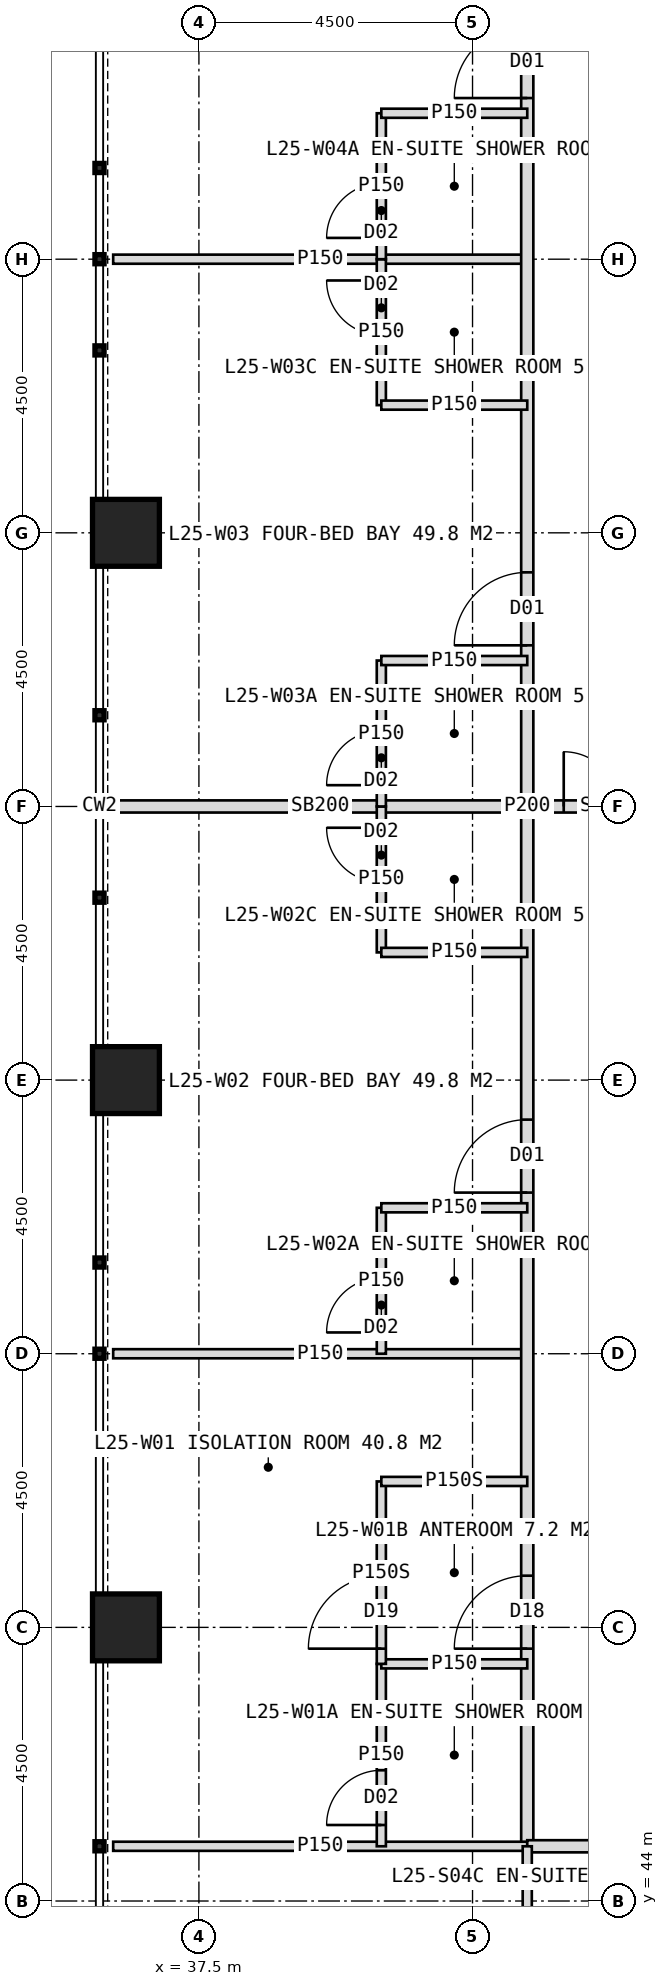
"""IFC4 building model, lengths in metres.
Left out: names, types, materials, properties, quantities, classifications, styles, units other than length and angle.
Written with IfcOpenShell. Run it as: python <this file> out.ifc"""

import sys

from ifc_helpers import new_model, si_unit, direction, frame, frame_2d, origin, origin_2d, place, context, subcontext, project, spatial, rectangle, hollow_rectangle, extrude, element, fill, save


model = new_model("IFC4")
c1 = context("Model", 3, precision=1e-05, world=origin(), true_north=direction((0.0, 1.0)))
c2 = subcontext(c1, "Body", "Model", "MODEL_VIEW")
j1 = project(units=[si_unit("LENGTHUNIT", "METRE"), si_unit("PLANEANGLEUNIT", "RADIAN")], contexts=[c1])
p1 = place(None, origin())
s1 = spatial("IfcSite", under=j1, at=p1, CompositionType="ELEMENT")
p2 = place(p1, origin())
s2 = spatial("IfcBuilding", under=s1, at=p2, CompositionType="ELEMENT")
p3 = place(p2, frame((0.0, 0.0, 108.0)))
s3 = spatial("IfcBuildingStorey", under=s2, at=p3, CompositionType="ELEMENT", Elevation=108.0)
for number, where, z_axis, x_axis in (
    (1, (36.3, 48.5, 0.0), (0.0, 0.0, 1.0), (1.0, 0.0, 0.0)),
    (2, (36.3, 57.5, 0.0), (0.0, 0.0, 1.0), (1.0, 0.0, 0.0)),
    (3, (36.3, 66.5, 0.0), (0.0, 0.0, 1.0), (1.0, 0.0, 0.0)),
):
    element("IfcColumn", number, at=place(p3, frame(where, z_axis=z_axis, x_axis=x_axis)), inside=s3, PredefinedType="COLUMN", context=c2, shape_type="SweptSolid", body=[
        extrude(hollow_rectangle(XDim=1.1, YDim=1.1, WallThickness=0.1, at=origin_2d()), origin(), (0.0, 0.0, 1.0), 4.0),
    ])
p4 = place(p3, frame((42.9, 53.0, 0.0), z_axis=(0.0, 0.0, 1.0), x_axis=(-1.0, 0.0, 0.0)))
e4 = element("IfcWall", 4, at=p4, inside=s3, PredefinedType="PARTITIONING", context=c2, shape_type="SweptSolid", body=[
    extrude(rectangle(XDim=6.81, YDim=0.15, at=frame_2d((3.405, 0.0))), origin(), (0.0, 0.0, 1.0), 3.75),
])
p5 = place(p3, frame((42.9, 62.0, 0.0), z_axis=(0.0, 0.0, 1.0), x_axis=(-1.0, 0.0, 0.0)))
e5 = element("IfcWall", 5, at=p5, inside=s3, PredefinedType="SOLIDWALL", context=c2, shape_type="SweptSolid", body=[
    extrude(rectangle(XDim=6.81, YDim=0.2, at=frame_2d((3.405, 0.0))), origin(), (0.0, 0.0, 1.0), 2.95),
])
p6 = place(p3, frame((42.9, 71.0, 0.0), z_axis=(0.0, 0.0, 1.0), x_axis=(-1.0, 0.0, 0.0)))
e6 = element("IfcWall", 6, at=p6, inside=s3, PredefinedType="PARTITIONING", context=c2, shape_type="SweptSolid", body=[
    extrude(rectangle(XDim=6.81, YDim=0.15, at=frame_2d((3.405, 0.0))), origin(), (0.0, 0.0, 1.0), 3.75),
])
p7 = place(p3, frame((42.9, 44.9, 0.0), z_axis=(0.0, 0.0, 1.0), x_axis=(0.0, 1.0, 0.0)))
e7 = element("IfcWall", 7, at=p7, inside=s3, PredefinedType="PARTITIONING", context=c2, shape_type="SweptSolid", body=[
    extrude(rectangle(XDim=34.2, YDim=0.2, at=frame_2d((17.1, 0.0))), origin(), (0.0, 0.0, 1.0), 3.75),
])
p8 = place(p7, frame((3.25, 0.0, 0.0)))
e8 = element("IfcOpeningElement", 8, at=p8, cuts=e7, PredefinedType="OPENING", context=c2, shape_type="SweptSolid", body=[
    extrude(rectangle(XDim=1.2, YDim=2.2, at=frame_2d((0.6, 1.1))), frame((0.0, 0.11, 0.0), z_axis=(0.0, -1.0, 0.0), x_axis=(1.0, 0.0, 0.0)), (0.0, 0.0, 1.0), 0.22),
])
p9 = place(p7, frame((10.75, 0.0, 0.0)))
e9 = element("IfcOpeningElement", 9, at=p9, cuts=e7, PredefinedType="OPENING", context=c2, shape_type="SweptSolid", body=[
    extrude(rectangle(XDim=1.2, YDim=2.2, at=frame_2d((0.6, 1.1))), frame((0.0, 0.11, 0.0), z_axis=(0.0, -1.0, 0.0), x_axis=(1.0, 0.0, 0.0)), (0.0, 0.0, 1.0), 0.22),
])
p10 = place(p7, frame((19.75, 0.0, 0.0)))
e10 = element("IfcOpeningElement", 10, at=p10, cuts=e7, PredefinedType="OPENING", context=c2, shape_type="SweptSolid", body=[
    extrude(rectangle(XDim=1.2, YDim=2.2, at=frame_2d((0.6, 1.1))), frame((0.0, 0.11, 0.0), z_axis=(0.0, -1.0, 0.0), x_axis=(1.0, 0.0, 0.0)), (0.0, 0.0, 1.0), 0.22),
])
p11 = place(p7, frame((28.75, 0.0, 0.0)))
e11 = element("IfcOpeningElement", 11, at=p11, cuts=e7, PredefinedType="OPENING", context=c2, shape_type="SweptSolid", body=[
    extrude(rectangle(XDim=1.2, YDim=2.2, at=frame_2d((0.6, 1.1))), frame((0.0, 0.11, 0.0), z_axis=(0.0, -1.0, 0.0), x_axis=(1.0, 0.0, 0.0)), (0.0, 0.0, 1.0), 0.22),
])
p12 = place(p3, frame((42.9, 44.9, 0.0), z_axis=(0.0, 0.0, 1.0), x_axis=(-1.0, 0.0, 0.0)))
e12 = element("IfcWall", 12, at=p12, inside=s3, PredefinedType="PARTITIONING", context=c2, shape_type="SweptSolid", body=[
    extrude(rectangle(XDim=6.81, YDim=0.15, at=frame_2d((3.405, 0.0))), origin(), (0.0, 0.0, 1.0), 3.75),
])
p13 = place(p3, frame((40.5, 44.9, 0.0), z_axis=(0.0, 0.0, 1.0), x_axis=(0.0, 1.0, 0.0)))
e13 = element("IfcWall", 13, at=p13, inside=s3, PredefinedType="PARTITIONING", context=c2, shape_type="SweptSolid", body=[
    extrude(rectangle(XDim=3.0, YDim=0.15, at=frame_2d((1.5, 0.0))), origin(), (0.0, 0.0, 1.0), 3.75),
])
p14 = place(p13, frame((0.35, 0.0, 0.0)))
e14 = element("IfcOpeningElement", 14, at=p14, cuts=e13, PredefinedType="OPENING", context=c2, shape_type="SweptSolid", body=[
    extrude(rectangle(XDim=0.9, YDim=2.1, at=frame_2d((0.45, 1.05))), frame((0.0, 0.085, 0.0), z_axis=(0.0, -1.0, 0.0), x_axis=(1.0, 0.0, 0.0)), (0.0, 0.0, 1.0), 0.17),
])
p15 = place(p3, frame((42.9, 47.9, 0.0), z_axis=(0.0, 0.0, 1.0), x_axis=(-1.0, 0.0, 0.0)))
e15 = element("IfcWall", 15, at=p15, inside=s3, PredefinedType="PARTITIONING", context=c2, shape_type="SweptSolid", body=[
    extrude(rectangle(XDim=2.4, YDim=0.15, at=frame_2d((1.2, 0.0))), origin(), (0.0, 0.0, 1.0), 3.75),
])
p16 = place(p3, frame((40.5, 47.9, 0.0), z_axis=(0.0, 0.0, 1.0), x_axis=(0.0, 1.0, 0.0)))
e16 = element("IfcWall", 16, at=p16, inside=s3, PredefinedType="PARTITIONING", context=c2, shape_type="SweptSolid", body=[
    extrude(rectangle(XDim=3.0, YDim=0.15, at=frame_2d((1.5, 0.0))), origin(), (0.0, 0.0, 1.0), 3.75),
])
p17 = place(p16, frame((0.25, 0.0, 0.0)))
e17 = element("IfcOpeningElement", 17, at=p17, cuts=e16, PredefinedType="OPENING", context=c2, shape_type="SweptSolid", body=[
    extrude(rectangle(XDim=1.2, YDim=2.2, at=frame_2d((0.6, 1.1))), frame((0.0, 0.085, 0.0), z_axis=(0.0, -1.0, 0.0), x_axis=(1.0, 0.0, 0.0)), (0.0, 0.0, 1.0), 0.17),
])
p18 = place(p3, frame((42.9, 50.9, 0.0), z_axis=(0.0, 0.0, 1.0), x_axis=(-1.0, 0.0, 0.0)))
e18 = element("IfcWall", 18, at=p18, inside=s3, PredefinedType="PARTITIONING", context=c2, shape_type="SweptSolid", body=[
    extrude(rectangle(XDim=2.4, YDim=0.15, at=frame_2d((1.2, 0.0))), origin(), (0.0, 0.0, 1.0), 3.75),
])
p19 = place(p3, frame((40.5, 53.0, 0.0), z_axis=(0.0, 0.0, 1.0), x_axis=(0.0, 1.0, 0.0)))
e19 = element("IfcWall", 19, at=p19, inside=s3, PredefinedType="PARTITIONING", context=c2, shape_type="SweptSolid", body=[
    extrude(rectangle(XDim=2.4, YDim=0.15, at=frame_2d((1.2, 0.0))), origin(), (0.0, 0.0, 1.0), 3.75),
])
p20 = place(p19, frame((0.35, 0.0, 0.0)))
e20 = element("IfcOpeningElement", 20, at=p20, cuts=e19, PredefinedType="OPENING", context=c2, shape_type="SweptSolid", body=[
    extrude(rectangle(XDim=0.9, YDim=2.1, at=frame_2d((0.45, 1.05))), frame((0.0, 0.085, 0.0), z_axis=(0.0, -1.0, 0.0), x_axis=(1.0, 0.0, 0.0)), (0.0, 0.0, 1.0), 0.17),
])
p21 = place(p3, frame((42.9, 55.4, 0.0), z_axis=(0.0, 0.0, 1.0), x_axis=(-1.0, 0.0, 0.0)))
e21 = element("IfcWall", 21, at=p21, inside=s3, PredefinedType="PARTITIONING", context=c2, shape_type="SweptSolid", body=[
    extrude(rectangle(XDim=2.4, YDim=0.15, at=frame_2d((1.2, 0.0))), origin(), (0.0, 0.0, 1.0), 3.75),
])
p22 = place(p3, frame((40.5, 59.6, 0.0), z_axis=(0.0, 0.0, 1.0), x_axis=(0.0, 1.0, 0.0)))
e22 = element("IfcWall", 22, at=p22, inside=s3, PredefinedType="PARTITIONING", context=c2, shape_type="SweptSolid", body=[
    extrude(rectangle(XDim=2.4, YDim=0.15, at=frame_2d((1.2, 0.0))), origin(), (0.0, 0.0, 1.0), 3.75),
])
p23 = place(p22, frame((1.15, 0.0, 0.0)))
e23 = element("IfcOpeningElement", 23, at=p23, cuts=e22, PredefinedType="OPENING", context=c2, shape_type="SweptSolid", body=[
    extrude(rectangle(XDim=0.9, YDim=2.1, at=frame_2d((0.45, 1.05))), frame((0.0, 0.085, 0.0), z_axis=(0.0, -1.0, 0.0), x_axis=(1.0, 0.0, 0.0)), (0.0, 0.0, 1.0), 0.17),
])
p24 = place(p3, frame((42.9, 59.6, 0.0), z_axis=(0.0, 0.0, 1.0), x_axis=(-1.0, 0.0, 0.0)))
e24 = element("IfcWall", 24, at=p24, inside=s3, PredefinedType="PARTITIONING", context=c2, shape_type="SweptSolid", body=[
    extrude(rectangle(XDim=2.4, YDim=0.15, at=frame_2d((1.2, 0.0))), origin(), (0.0, 0.0, 1.0), 3.75),
])
p25 = place(p3, frame((40.5, 62.0, 0.0), z_axis=(0.0, 0.0, 1.0), x_axis=(0.0, 1.0, 0.0)))
e25 = element("IfcWall", 25, at=p25, inside=s3, PredefinedType="PARTITIONING", context=c2, shape_type="SweptSolid", body=[
    extrude(rectangle(XDim=2.4, YDim=0.15, at=frame_2d((1.2, 0.0))), origin(), (0.0, 0.0, 1.0), 3.75),
])
p26 = place(p25, frame((0.35, 0.0, 0.0)))
e26 = element("IfcOpeningElement", 26, at=p26, cuts=e25, PredefinedType="OPENING", context=c2, shape_type="SweptSolid", body=[
    extrude(rectangle(XDim=0.9, YDim=2.1, at=frame_2d((0.45, 1.05))), frame((0.0, 0.085, 0.0), z_axis=(0.0, -1.0, 0.0), x_axis=(1.0, 0.0, 0.0)), (0.0, 0.0, 1.0), 0.17),
])
p27 = place(p3, frame((42.9, 64.4, 0.0), z_axis=(0.0, 0.0, 1.0), x_axis=(-1.0, 0.0, 0.0)))
e27 = element("IfcWall", 27, at=p27, inside=s3, PredefinedType="PARTITIONING", context=c2, shape_type="SweptSolid", body=[
    extrude(rectangle(XDim=2.4, YDim=0.15, at=frame_2d((1.2, 0.0))), origin(), (0.0, 0.0, 1.0), 3.75),
])
p28 = place(p3, frame((40.5, 68.6, 0.0), z_axis=(0.0, 0.0, 1.0), x_axis=(0.0, 1.0, 0.0)))
e28 = element("IfcWall", 28, at=p28, inside=s3, PredefinedType="PARTITIONING", context=c2, shape_type="SweptSolid", body=[
    extrude(rectangle(XDim=2.4, YDim=0.15, at=frame_2d((1.2, 0.0))), origin(), (0.0, 0.0, 1.0), 3.75),
])
p29 = place(p28, frame((1.15, 0.0, 0.0)))
e29 = element("IfcOpeningElement", 29, at=p29, cuts=e28, PredefinedType="OPENING", context=c2, shape_type="SweptSolid", body=[
    extrude(rectangle(XDim=0.9, YDim=2.1, at=frame_2d((0.45, 1.05))), frame((0.0, 0.085, 0.0), z_axis=(0.0, -1.0, 0.0), x_axis=(1.0, 0.0, 0.0)), (0.0, 0.0, 1.0), 0.17),
])
p30 = place(p3, frame((42.9, 68.6, 0.0), z_axis=(0.0, 0.0, 1.0), x_axis=(-1.0, 0.0, 0.0)))
e30 = element("IfcWall", 30, at=p30, inside=s3, PredefinedType="PARTITIONING", context=c2, shape_type="SweptSolid", body=[
    extrude(rectangle(XDim=2.4, YDim=0.15, at=frame_2d((1.2, 0.0))), origin(), (0.0, 0.0, 1.0), 3.75),
])
p31 = place(p3, frame((40.5, 71.0, 0.0), z_axis=(0.0, 0.0, 1.0), x_axis=(0.0, 1.0, 0.0)))
e31 = element("IfcWall", 31, at=p31, inside=s3, PredefinedType="PARTITIONING", context=c2, shape_type="SweptSolid", body=[
    extrude(rectangle(XDim=2.4, YDim=0.15, at=frame_2d((1.2, 0.0))), origin(), (0.0, 0.0, 1.0), 3.75),
])
p32 = place(p31, frame((0.35, 0.0, 0.0)))
e32 = element("IfcOpeningElement", 32, at=p32, cuts=e31, PredefinedType="OPENING", context=c2, shape_type="SweptSolid", body=[
    extrude(rectangle(XDim=0.9, YDim=2.1, at=frame_2d((0.45, 1.05))), frame((0.0, 0.085, 0.0), z_axis=(0.0, -1.0, 0.0), x_axis=(1.0, 0.0, 0.0)), (0.0, 0.0, 1.0), 0.17),
])
p33 = place(p3, frame((42.9, 73.4, 0.0), z_axis=(0.0, 0.0, 1.0), x_axis=(-1.0, 0.0, 0.0)))
e33 = element("IfcWall", 33, at=p33, inside=s3, PredefinedType="PARTITIONING", context=c2, shape_type="SweptSolid", body=[
    extrude(rectangle(XDim=2.4, YDim=0.15, at=frame_2d((1.2, 0.0))), origin(), (0.0, 0.0, 1.0), 3.75),
])
p34 = place(p3, frame((77.1, 44.9, 0.0), z_axis=(0.0, 0.0, 1.0), x_axis=(-1.0, 0.0, 0.0)))
e34 = element("IfcWall", 34, at=p34, inside=s3, PredefinedType="PARTITIONING", context=c2, shape_type="SweptSolid", body=[
    extrude(rectangle(XDim=34.2, YDim=0.2, at=frame_2d((17.1, 0.0))), origin(), (0.0, 0.0, 1.0), 3.75),
])
p35 = place(p34, frame((3.25, 0.0, 0.0)))
e35 = element("IfcOpeningElement", 35, at=p35, cuts=e34, PredefinedType="OPENING", context=c2, shape_type="SweptSolid", body=[
    extrude(rectangle(XDim=1.2, YDim=2.2, at=frame_2d((0.6, 1.1))), frame((0.0, 0.11, 0.0), z_axis=(0.0, -1.0, 0.0), x_axis=(1.0, 0.0, 0.0)), (0.0, 0.0, 1.0), 0.22),
])
p36 = place(p34, frame((9.25, 0.0, 0.0)))
e36 = element("IfcOpeningElement", 36, at=p36, cuts=e34, PredefinedType="OPENING", context=c2, shape_type="SweptSolid", body=[
    extrude(rectangle(XDim=1.2, YDim=2.2, at=frame_2d((0.6, 1.1))), frame((0.0, 0.11, 0.0), z_axis=(0.0, -1.0, 0.0), x_axis=(1.0, 0.0, 0.0)), (0.0, 0.0, 1.0), 0.22),
])
p37 = place(p34, frame((18.25, 0.0, 0.0)))
e37 = element("IfcOpeningElement", 37, at=p37, cuts=e34, PredefinedType="OPENING", context=c2, shape_type="SweptSolid", body=[
    extrude(rectangle(XDim=1.2, YDim=2.2, at=frame_2d((0.6, 1.1))), frame((0.0, 0.11, 0.0), z_axis=(0.0, -1.0, 0.0), x_axis=(1.0, 0.0, 0.0)), (0.0, 0.0, 1.0), 0.22),
])
p38 = place(p34, frame((27.25, 0.0, 0.0)))
e38 = element("IfcOpeningElement", 38, at=p38, cuts=e34, PredefinedType="OPENING", context=c2, shape_type="SweptSolid", body=[
    extrude(rectangle(XDim=1.2, YDim=2.2, at=frame_2d((0.6, 1.1))), frame((0.0, 0.11, 0.0), z_axis=(0.0, -1.0, 0.0), x_axis=(1.0, 0.0, 0.0)), (0.0, 0.0, 1.0), 0.22),
])
p39 = place(p3, frame((42.9, 44.9, 0.0), z_axis=(0.0, 0.0, 1.0), x_axis=(0.0, -1.0, 0.0)))
e39 = element("IfcWall", 39, at=p39, inside=s3, PredefinedType="PARTITIONING", context=c2, shape_type="SweptSolid", body=[
    extrude(rectangle(XDim=2.4, YDim=0.15, at=frame_2d((1.2, 0.0))), origin(), (0.0, 0.0, 1.0), 3.75),
])
p40 = place(p3, frame((45.6, 62.0, 0.0), z_axis=(0.0, 0.0, 1.0), x_axis=(-1.0, 0.0, 0.0)))
e40 = element("IfcWall", 40, at=p40, inside=s3, PredefinedType="SOLIDWALL", context=c2, shape_type="SweptSolid", body=[
    extrude(rectangle(XDim=2.7, YDim=0.2, at=frame_2d((1.35, 0.0))), origin(), (0.0, 0.0, 1.0), 2.95),
])
p41 = place(p40, frame((0.3, 0.0, 0.0)))
e41 = element("IfcOpeningElement", 41, at=p41, cuts=e40, PredefinedType="OPENING", context=c2, shape_type="SweptSolid", body=[
    extrude(rectangle(XDim=1.8, YDim=2.2, at=frame_2d((0.9, 1.1))), frame((0.0, 0.11, 0.0), z_axis=(0.0, -1.0, 0.0), x_axis=(1.0, 0.0, 0.0)), (0.0, 0.0, 1.0), 0.22),
])
p42 = place(p17, origin())
e42 = element("IfcDoor", 42, at=p42, inside=s3, OperationType="SINGLE_SWING_LEFT", PredefinedType="DOOR", context=c2, shape_type="SweptSolid", body=[
    extrude(rectangle(XDim=1.2, YDim=2.2, at=frame_2d((0.6, 1.1))), frame((0.0, 0.025, 0.0), z_axis=(0.0, -1.0, 0.0), x_axis=(1.0, 0.0, 0.0)), (0.0, 0.0, 1.0), 0.05),
])
fill(e17, e42)
p43 = place(p8, origin())
e43 = element("IfcDoor", 43, at=p43, inside=s3, OperationType="SINGLE_SWING_LEFT", PredefinedType="DOOR", context=c2, shape_type="SweptSolid", body=[
    extrude(rectangle(XDim=1.2, YDim=2.2, at=frame_2d((0.6, 1.1))), frame((0.0, 0.025, 0.0), z_axis=(0.0, -1.0, 0.0), x_axis=(1.0, 0.0, 0.0)), (0.0, 0.0, 1.0), 0.05),
])
fill(e8, e43)
p44 = place(p14, origin())
e44 = element("IfcDoor", 44, at=p44, inside=s3, OperationType="SINGLE_SWING_LEFT", PredefinedType="DOOR", context=c2, shape_type="SweptSolid", body=[
    extrude(rectangle(XDim=0.9, YDim=2.1, at=frame_2d((0.45, 1.05))), frame((0.0, 0.025, 0.0), z_axis=(0.0, -1.0, 0.0), x_axis=(1.0, 0.0, 0.0)), (0.0, 0.0, 1.0), 0.05),
])
fill(e14, e44)
p45 = place(p9, origin())
e45 = element("IfcDoor", 45, at=p45, inside=s3, OperationType="SINGLE_SWING_LEFT", PredefinedType="DOOR", context=c2, shape_type="SweptSolid", body=[
    extrude(rectangle(XDim=1.2, YDim=2.2, at=frame_2d((0.6, 1.1))), frame((0.0, 0.025, 0.0), z_axis=(0.0, -1.0, 0.0), x_axis=(1.0, 0.0, 0.0)), (0.0, 0.0, 1.0), 0.05),
])
fill(e9, e45)
p46 = place(p20, origin())
e46 = element("IfcDoor", 46, at=p46, inside=s3, OperationType="SINGLE_SWING_LEFT", PredefinedType="DOOR", context=c2, shape_type="SweptSolid", body=[
    extrude(rectangle(XDim=0.9, YDim=2.1, at=frame_2d((0.45, 1.05))), frame((0.0, 0.025, 0.0), z_axis=(0.0, -1.0, 0.0), x_axis=(1.0, 0.0, 0.0)), (0.0, 0.0, 1.0), 0.05),
])
fill(e20, e46)
p47 = place(p23, origin())
e47 = element("IfcDoor", 47, at=p47, inside=s3, OperationType="SINGLE_SWING_RIGHT", PredefinedType="DOOR", context=c2, shape_type="SweptSolid", body=[
    extrude(rectangle(XDim=0.9, YDim=2.1, at=frame_2d((0.45, 1.05))), frame((0.0, 0.025, 0.0), z_axis=(0.0, -1.0, 0.0), x_axis=(1.0, 0.0, 0.0)), (0.0, 0.0, 1.0), 0.05),
])
fill(e23, e47)
p48 = place(p10, origin())
e48 = element("IfcDoor", 48, at=p48, inside=s3, OperationType="SINGLE_SWING_LEFT", PredefinedType="DOOR", context=c2, shape_type="SweptSolid", body=[
    extrude(rectangle(XDim=1.2, YDim=2.2, at=frame_2d((0.6, 1.1))), frame((0.0, 0.025, 0.0), z_axis=(0.0, -1.0, 0.0), x_axis=(1.0, 0.0, 0.0)), (0.0, 0.0, 1.0), 0.05),
])
fill(e10, e48)
p49 = place(p26, origin())
e49 = element("IfcDoor", 49, at=p49, inside=s3, OperationType="SINGLE_SWING_LEFT", PredefinedType="DOOR", context=c2, shape_type="SweptSolid", body=[
    extrude(rectangle(XDim=0.9, YDim=2.1, at=frame_2d((0.45, 1.05))), frame((0.0, 0.025, 0.0), z_axis=(0.0, -1.0, 0.0), x_axis=(1.0, 0.0, 0.0)), (0.0, 0.0, 1.0), 0.05),
])
fill(e26, e49)
p50 = place(p29, origin())
e50 = element("IfcDoor", 50, at=p50, inside=s3, OperationType="SINGLE_SWING_RIGHT", PredefinedType="DOOR", context=c2, shape_type="SweptSolid", body=[
    extrude(rectangle(XDim=0.9, YDim=2.1, at=frame_2d((0.45, 1.05))), frame((0.0, 0.025, 0.0), z_axis=(0.0, -1.0, 0.0), x_axis=(1.0, 0.0, 0.0)), (0.0, 0.0, 1.0), 0.05),
])
fill(e29, e50)
p51 = place(p11, origin())
e51 = element("IfcDoor", 51, at=p51, inside=s3, OperationType="SINGLE_SWING_LEFT", PredefinedType="DOOR", context=c2, shape_type="SweptSolid", body=[
    extrude(rectangle(XDim=1.2, YDim=2.2, at=frame_2d((0.6, 1.1))), frame((0.0, 0.025, 0.0), z_axis=(0.0, -1.0, 0.0), x_axis=(1.0, 0.0, 0.0)), (0.0, 0.0, 1.0), 0.05),
])
fill(e11, e51)
p52 = place(p32, origin())
e52 = element("IfcDoor", 52, at=p52, inside=s3, OperationType="SINGLE_SWING_LEFT", PredefinedType="DOOR", context=c2, shape_type="SweptSolid", body=[
    extrude(rectangle(XDim=0.9, YDim=2.1, at=frame_2d((0.45, 1.05))), frame((0.0, 0.025, 0.0), z_axis=(0.0, -1.0, 0.0), x_axis=(1.0, 0.0, 0.0)), (0.0, 0.0, 1.0), 0.05),
])
fill(e32, e52)
p53 = place(p41, origin())
e53 = element("IfcDoor", 53, at=p53, inside=s3, OperationType="DOUBLE_DOOR_DOUBLE_SWING", PredefinedType="DOOR", context=c2, shape_type="SweptSolid", body=[
    extrude(rectangle(XDim=1.8, YDim=2.2, at=frame_2d((0.9, 1.1))), frame((0.0, 0.025, 0.0), z_axis=(0.0, -1.0, 0.0), x_axis=(1.0, 0.0, 0.0)), (0.0, 0.0, 1.0), 0.05),
])
fill(e41, e53)
save(model, sys.argv[1])
